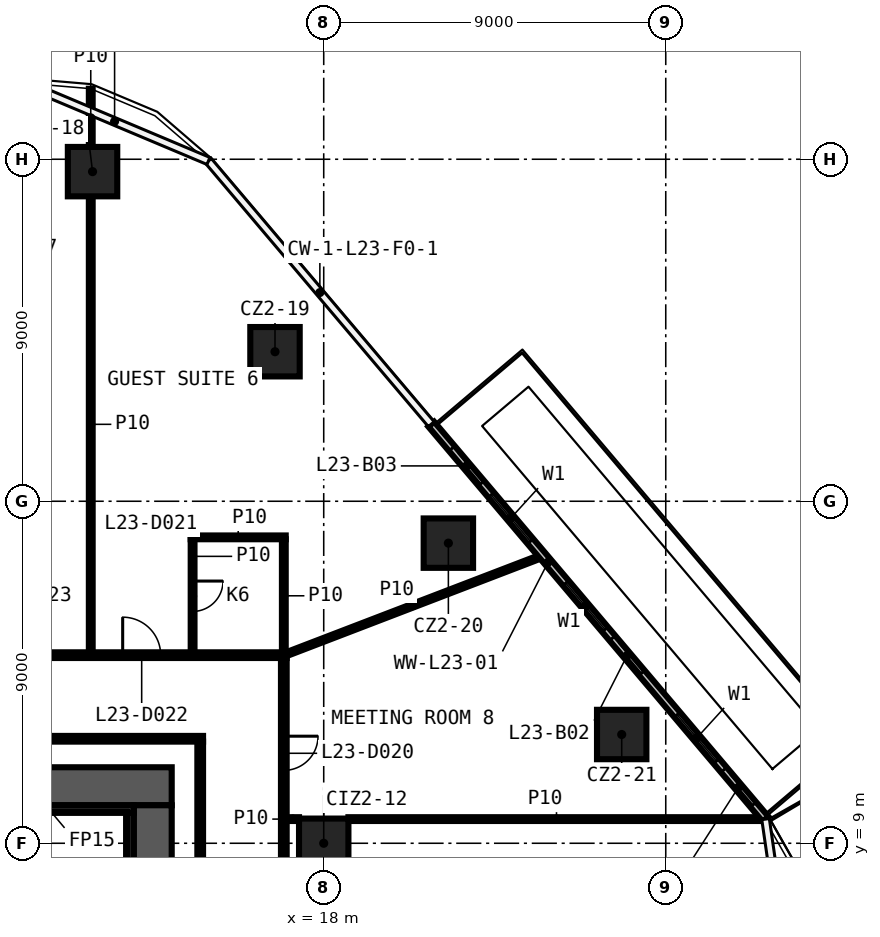
"""IFC4 building model, lengths in metres.
Left out: names, types, materials, properties, quantities, classifications, styles, units other than length and angle.
Written with IfcOpenShell. Run it as: python <this file> out.ifc"""

import sys

from ifc_helpers import new_model, si_unit, direction, frame, frame_2d, origin, origin_2d, place, context, subcontext, project, spatial, rectangle, extrude, element, fill, save


model = new_model("IFC4")
c1 = context("Model", 3, precision=1e-05, world=origin(), true_north=direction((0.0, 1.0)))
c2 = subcontext(c1, "Body", "Model", "MODEL_VIEW")
j1 = project(units=[si_unit("LENGTHUNIT", "METRE"), si_unit("PLANEANGLEUNIT", "RADIAN")], contexts=[c1])
p1 = place(None, origin())
s1 = spatial("IfcSite", under=j1, at=p1, CompositionType="ELEMENT")
p2 = place(p1, origin())
s2 = spatial("IfcBuilding", under=s1, at=p2, CompositionType="ELEMENT")
p3 = place(p2, frame((0.0, 0.0, 110.0)))
s3 = spatial("IfcBuildingStorey", under=s2, at=p3, CompositionType="ELEMENT", Elevation=110.0)
for number, where, z_axis, x_axis in (
    (1, (11.917, 26.674, 0.0), (0.0, 0.0, 1.0), (1.0, 0.0, 0.0)),
    (2, (16.718, 21.935, 0.0), (0.0, 0.0, 1.0), (1.0, 0.0, 0.0)),
    (3, (21.28, 16.898, 0.0), (0.0, 0.0, 1.0), (1.0, 0.0, 0.0)),
    (4, (25.841, 11.862, 0.0), (0.0, 0.0, 1.0), (1.0, 0.0, 0.0)),
    (5, (18.0, 9.0, 0.0), (0.0, 0.0, 1.0), (1.0, 0.0, 0.0)),
):
    element("IfcColumn", number, at=place(p3, frame(where, z_axis=z_axis, x_axis=x_axis)), inside=s3, PredefinedType="COLUMN", context=c2, shape_type="SweptSolid", body=[
        extrude(rectangle(XDim=1.3, YDim=1.3, at=origin_2d()), origin(), (0.0, 0.0, 1.0), 3.3),
    ])
p4 = place(p3, frame((17.025, 9.636, 0.0), z_axis=(0.0, 0.0, 1.0), x_axis=(1.0, 0.0, 0.0)))
e6 = element("IfcWall", 6, at=p4, inside=s3, PredefinedType="PARTITIONING", context=c2, shape_type="SweptSolid", body=[
    extrude(rectangle(XDim=0.325, YDim=0.1, at=frame_2d((0.163, 0.0))), origin(), (0.0, 0.0, 1.0), 3.3),
])
p5 = place(p3, frame((18.65, 9.636, 0.0), z_axis=(0.0, 0.0, 1.0), x_axis=(1.0, 0.0, 0.0)))
e7 = element("IfcWall", 7, at=p5, inside=s3, PredefinedType="PARTITIONING", context=c2, shape_type="SweptSolid", body=[
    extrude(rectangle(XDim=10.95, YDim=0.1, at=frame_2d((5.475, 0.0))), origin(), (0.0, 0.0, 1.0), 3.3),
])
p6 = place(p3, frame((3.6, 11.75, 0.0), z_axis=(0.0, 0.0, 1.0), x_axis=(1.0, 0.0, 0.0)))
e8 = element("IfcWall", 8, at=p6, inside=s3, PredefinedType="PARTITIONING", context=c2, shape_type="SweptSolid", body=[
    extrude(rectangle(XDim=11.225, YDim=0.15, at=frame_2d((5.612, 0.0))), origin(), (0.0, 0.0, 1.0), 3.3),
])
p7 = place(p3, frame((-17.025, 13.95, 0.0), z_axis=(0.0, 0.0, 1.0), x_axis=(1.0, 0.0, 0.0)))
e9 = element("IfcWall", 9, at=p7, inside=s3, PredefinedType="PARTITIONING", context=c2, shape_type="SweptSolid", body=[
    extrude(rectangle(XDim=34.05, YDim=0.15, at=frame_2d((17.025, 0.0))), origin(), (0.0, 0.0, 1.0), 3.3),
])
p8 = place(p7, frame((29.735, 0.0, 0.0)))
e10 = element("IfcOpeningElement", 10, at=p8, cuts=e9, PredefinedType="OPENING", context=c2, shape_type="SweptSolid", body=[
    extrude(rectangle(XDim=1.0, YDim=2.1, at=frame_2d((0.5, 1.05))), frame((0.0, 0.085, 0.0), z_axis=(0.0, -1.0, 0.0), x_axis=(1.0, 0.0, 0.0)), (0.0, 0.0, 1.0), 0.17),
])
p9 = place(p7, frame((25.513, 0.0, 0.0)))
e11 = element("IfcOpeningElement", 11, at=p9, cuts=e9, PredefinedType="OPENING", context=c2, shape_type="SweptSolid", body=[
    extrude(rectangle(XDim=1.0, YDim=2.1, at=frame_2d((0.5, 1.05))), frame((0.0, 0.085, 0.0), z_axis=(0.0, -1.0, 0.0), x_axis=(1.0, 0.0, 0.0)), (0.0, 0.0, 1.0), 0.17),
])
p10 = place(p7, frame((18.631, 0.0, 0.0)))
e12 = element("IfcOpeningElement", 12, at=p10, cuts=e9, PredefinedType="OPENING", context=c2, shape_type="SweptSolid", body=[
    extrude(rectangle(XDim=1.0, YDim=2.1, at=frame_2d((0.5, 1.05))), frame((0.0, 0.085, 0.0), z_axis=(0.0, -1.0, 0.0), x_axis=(1.0, 0.0, 0.0)), (0.0, 0.0, 1.0), 0.17),
])
p11 = place(p7, frame((16.545, 0.0, 0.0)))
e13 = element("IfcOpeningElement", 13, at=p11, cuts=e9, PredefinedType="OPENING", context=c2, shape_type="SweptSolid", body=[
    extrude(rectangle(XDim=1.0, YDim=2.1, at=frame_2d((0.5, 1.05))), frame((0.0, 0.085, 0.0), z_axis=(0.0, -1.0, 0.0), x_axis=(1.0, 0.0, 0.0)), (0.0, 0.0, 1.0), 0.17),
])
p12 = place(p7, frame((9.659, 0.0, 0.0)))
e14 = element("IfcOpeningElement", 14, at=p12, cuts=e9, PredefinedType="OPENING", context=c2, shape_type="SweptSolid", body=[
    extrude(rectangle(XDim=1.0, YDim=2.1, at=frame_2d((0.5, 1.05))), frame((0.0, 0.085, 0.0), z_axis=(0.0, -1.0, 0.0), x_axis=(1.0, 0.0, 0.0)), (0.0, 0.0, 1.0), 0.17),
])
p13 = place(p7, frame((7.577, 0.0, 0.0)))
e15 = element("IfcOpeningElement", 15, at=p13, cuts=e9, PredefinedType="OPENING", context=c2, shape_type="SweptSolid", body=[
    extrude(rectangle(XDim=1.0, YDim=2.1, at=frame_2d((0.5, 1.05))), frame((0.0, 0.085, 0.0), z_axis=(0.0, -1.0, 0.0), x_axis=(1.0, 0.0, 0.0)), (0.0, 0.0, 1.0), 0.17),
])
p14 = place(p7, frame((2.381, 0.0, 0.0)))
e16 = element("IfcOpeningElement", 16, at=p14, cuts=e9, PredefinedType="OPENING", context=c2, shape_type="SweptSolid", body=[
    extrude(rectangle(XDim=0.9, YDim=2.1, at=frame_2d((0.45, 1.05))), frame((0.0, 0.085, 0.0), z_axis=(0.0, -1.0, 0.0), x_axis=(1.0, 0.0, 0.0)), (0.0, 0.0, 1.0), 0.17),
])
p15 = place(p3, frame((14.5, 17.05, 0.0), z_axis=(0.0, 0.0, 1.0), x_axis=(1.0, 0.0, 0.0)))
e17 = element("IfcWall", 17, at=p15, inside=s3, PredefinedType="PARTITIONING", context=c2, shape_type="SweptSolid", body=[
    extrude(rectangle(XDim=2.5, YDim=0.1, at=frame_2d((1.25, 0.0))), origin(), (0.0, 0.0, 1.0), 3.3),
])
p16 = place(p3, frame((16.95, 13.95, 0.0), z_axis=(0.0, 0.0, 1.0), x_axis=(0.933635037811, 0.358225649796, 0.0)))
e18 = element("IfcWall", 18, at=p16, inside=s3, PredefinedType="PARTITIONING", context=c2, shape_type="SweptSolid", body=[
    extrude(rectangle(XDim=7.275, YDim=0.1, at=frame_2d((3.638, 0.0))), origin(), (0.0, 0.0, 1.0), 3.3),
])
p17 = place(p3, frame((16.95, 13.875, 0.0), z_axis=(0.0, 0.0, 1.0), x_axis=(0.0, -1.0, 0.0)))
e19 = element("IfcWall", 19, at=p17, inside=s3, PredefinedType="PARTITIONING", context=c2, shape_type="SweptSolid", body=[
    extrude(rectangle(XDim=27.75, YDim=0.15, at=frame_2d((13.875, 0.0))), origin(), (0.0, 0.0, 1.0), 3.3),
])
p18 = place(p17, frame((24.917, 0.0, 0.0)))
e20 = element("IfcOpeningElement", 20, at=p18, cuts=e19, PredefinedType="OPENING", context=c2, shape_type="SweptSolid", body=[
    extrude(rectangle(XDim=0.9, YDim=2.1, at=frame_2d((0.45, 1.05))), frame((0.0, 0.085, 0.0), z_axis=(0.0, -1.0, 0.0), x_axis=(1.0, 0.0, 0.0)), (0.0, 0.0, 1.0), 0.17),
])
p19 = place(p17, frame((20.086, 0.0, 0.0)))
e21 = element("IfcOpeningElement", 21, at=p19, cuts=e19, PredefinedType="OPENING", context=c2, shape_type="SweptSolid", body=[
    extrude(rectangle(XDim=0.9, YDim=2.1, at=frame_2d((0.45, 1.05))), frame((0.0, 0.085, 0.0), z_axis=(0.0, -1.0, 0.0), x_axis=(1.0, 0.0, 0.0)), (0.0, 0.0, 1.0), 0.17),
])
p20 = place(p17, frame((16.047, 0.0, 0.0)))
e22 = element("IfcOpeningElement", 22, at=p20, cuts=e19, PredefinedType="OPENING", context=c2, shape_type="SweptSolid", body=[
    extrude(rectangle(XDim=0.9, YDim=2.1, at=frame_2d((0.45, 1.05))), frame((0.0, 0.085, 0.0), z_axis=(0.0, -1.0, 0.0), x_axis=(1.0, 0.0, 0.0)), (0.0, 0.0, 1.0), 0.17),
])
p21 = place(p17, frame((11.091, 0.0, 0.0)))
e23 = element("IfcOpeningElement", 23, at=p21, cuts=e19, PredefinedType="OPENING", context=c2, shape_type="SweptSolid", body=[
    extrude(rectangle(XDim=0.9, YDim=2.1, at=frame_2d((0.45, 1.05))), frame((0.0, 0.085, 0.0), z_axis=(0.0, -1.0, 0.0), x_axis=(1.0, 0.0, 0.0)), (0.0, 0.0, 1.0), 0.17),
])
p22 = place(p17, frame((7.093, 0.0, 0.0)))
e24 = element("IfcOpeningElement", 24, at=p22, cuts=e19, PredefinedType="OPENING", context=c2, shape_type="SweptSolid", body=[
    extrude(rectangle(XDim=0.9, YDim=2.1, at=frame_2d((0.45, 1.05))), frame((0.0, 0.085, 0.0), z_axis=(0.0, -1.0, 0.0), x_axis=(1.0, 0.0, 0.0)), (0.0, 0.0, 1.0), 0.17),
])
p23 = place(p17, frame((2.057, 0.0, 0.0)))
e25 = element("IfcOpeningElement", 25, at=p23, cuts=e19, PredefinedType="OPENING", context=c2, shape_type="SweptSolid", body=[
    extrude(rectangle(XDim=0.9, YDim=2.1, at=frame_2d((0.45, 1.05))), frame((0.0, 0.085, 0.0), z_axis=(0.0, -1.0, 0.0), x_axis=(1.0, 0.0, 0.0)), (0.0, 0.0, 1.0), 0.17),
])
p24 = place(p3, frame((16.95, 14.025, 0.0), z_axis=(0.0, 0.0, 1.0), x_axis=(0.0, 1.0, 0.0)))
e26 = element("IfcWall", 26, at=p24, inside=s3, PredefinedType="PARTITIONING", context=c2, shape_type="SweptSolid", body=[
    extrude(rectangle(XDim=2.975, YDim=0.1, at=frame_2d((1.488, 0.0))), origin(), (0.0, 0.0, 1.0), 3.3),
])
p25 = place(p3, frame((14.75, -11.675, 0.0), z_axis=(0.0, 0.0, 1.0), x_axis=(0.0, 1.0, 0.0)))
e27 = element("IfcWall", 27, at=p25, inside=s3, PredefinedType="PARTITIONING", context=c2, shape_type="SweptSolid", body=[
    extrude(rectangle(XDim=23.35, YDim=0.15, at=frame_2d((11.675, 0.0))), origin(), (0.0, 0.0, 1.0), 3.3),
])
p26 = place(p25, frame((11.225, 0.0, 0.0)))
e28 = element("IfcOpeningElement", 28, at=p26, cuts=e27, PredefinedType="OPENING", context=c2, shape_type="SweptSolid", body=[
    extrude(rectangle(XDim=0.9, YDim=2.1, at=frame_2d((0.45, 1.05))), frame((0.0, 0.085, 0.0), z_axis=(0.0, -1.0, 0.0), x_axis=(1.0, 0.0, 0.0)), (0.0, 0.0, 1.0), 0.17),
])
p27 = place(p3, frame((14.55, 17.0, 0.0), z_axis=(0.0, 0.0, 1.0), x_axis=(0.0, -1.0, 0.0)))
e29 = element("IfcWall", 29, at=p27, inside=s3, PredefinedType="PARTITIONING", context=c2, shape_type="SweptSolid", body=[
    extrude(rectangle(XDim=2.975, YDim=0.1, at=frame_2d((1.488, 0.0))), origin(), (0.0, 0.0, 1.0), 3.3),
])
p28 = place(p27, frame((1.1, 0.0, 0.0)))
e30 = element("IfcOpeningElement", 30, at=p28, cuts=e29, PredefinedType="OPENING", context=c2, shape_type="SweptSolid", body=[
    extrude(rectangle(XDim=0.8, YDim=2.1, at=frame_2d((0.4, 1.05))), frame((0.0, 0.06, 0.0), z_axis=(0.0, -1.0, 0.0), x_axis=(1.0, 0.0, 0.0)), (0.0, 0.0, 1.0), 0.12),
])
p29 = place(p3, frame((11.87, 14.025, 0.0), z_axis=(0.0, 0.0, 1.0), x_axis=(0.0, 1.0, 0.0)))
e31 = element("IfcWall", 31, at=p29, inside=s3, PredefinedType="PARTITIONING", context=c2, shape_type="SweptSolid", body=[
    extrude(rectangle(XDim=11.999, YDim=0.1, at=frame_2d((6.0, 0.0))), origin(), (0.0, 0.0, 1.0), 3.3),
])
p30 = place(p3, frame((11.87, 27.324, 0.0), z_axis=(0.0, 0.0, 1.0), x_axis=(0.0, 1.0, 0.0)))
e32 = element("IfcWall", 32, at=p30, inside=s3, PredefinedType="PARTITIONING", context=c2, shape_type="SweptSolid", body=[
    extrude(rectangle(XDim=1.531, YDim=0.1, at=frame_2d((0.766, 0.0))), origin(), (0.0, 0.0, 1.0), 3.3),
])
p31 = place(p3, frame((29.626, 9.636, 0.0), z_axis=(0.0, 0.0, 1.0), x_axis=(-0.6460547702, 0.763291054514, 0.0)))
e33 = element("IfcWall", 33, at=p31, inside=s3, PredefinedType="SOLIDWALL", context=c2, shape_type="SweptSolid", body=[
    extrude(rectangle(XDim=13.615, YDim=0.2, at=frame_2d((6.808, 0.0))), origin(), (0.0, 0.0, 1.0), 3.3),
])
p32 = place(p31, frame((2.0, 0.0, 0.6)))
e34 = element("IfcOpeningElement", 34, at=p32, cuts=e33, PredefinedType="OPENING", context=c2, shape_type="SweptSolid", body=[
    extrude(rectangle(XDim=1.6, YDim=2.4, at=frame_2d((0.8, 1.2))), frame((0.0, 0.11, 0.0), z_axis=(0.0, -1.0, 0.0), x_axis=(1.0, 0.0, 0.0)), (0.0, 0.0, 1.0), 0.22),
])
p33 = place(p31, frame((0.5, 0.0, 0.0)))
e35 = element("IfcOpeningElement", 35, at=p33, cuts=e33, PredefinedType="OPENING", context=c2, shape_type="SweptSolid", body=[
    extrude(rectangle(XDim=1.2, YDim=2.4, at=frame_2d((0.6, 1.2))), frame((0.0, 0.11, 0.0), z_axis=(0.0, -1.0, 0.0), x_axis=(1.0, 0.0, 0.0)), (0.0, 0.0, 1.0), 0.22),
])
p34 = place(p31, frame((6.538, 0.0, 0.6)))
e36 = element("IfcOpeningElement", 36, at=p34, cuts=e33, PredefinedType="OPENING", context=c2, shape_type="SweptSolid", body=[
    extrude(rectangle(XDim=1.6, YDim=2.4, at=frame_2d((0.8, 1.2))), frame((0.0, 0.11, 0.0), z_axis=(0.0, -1.0, 0.0), x_axis=(1.0, 0.0, 0.0)), (0.0, 0.0, 1.0), 0.22),
])
p35 = place(p31, frame((5.038, 0.0, 0.0)))
e37 = element("IfcOpeningElement", 37, at=p35, cuts=e33, PredefinedType="OPENING", context=c2, shape_type="SweptSolid", body=[
    extrude(rectangle(XDim=1.2, YDim=2.4, at=frame_2d((0.6, 1.2))), frame((0.0, 0.11, 0.0), z_axis=(0.0, -1.0, 0.0), x_axis=(1.0, 0.0, 0.0)), (0.0, 0.0, 1.0), 0.22),
])
p36 = place(p31, frame((9.577, 0.0, 0.6)))
e38 = element("IfcOpeningElement", 38, at=p36, cuts=e33, PredefinedType="OPENING", context=c2, shape_type="SweptSolid", body=[
    extrude(rectangle(XDim=1.6, YDim=2.4, at=frame_2d((0.8, 1.2))), frame((0.0, 0.11, 0.0), z_axis=(0.0, -1.0, 0.0), x_axis=(1.0, 0.0, 0.0)), (0.0, 0.0, 1.0), 0.22),
])
p37 = place(p31, frame((11.577, 0.0, 0.0)))
e39 = element("IfcOpeningElement", 39, at=p37, cuts=e33, PredefinedType="OPENING", context=c2, shape_type="SweptSolid", body=[
    extrude(rectangle(XDim=1.2, YDim=2.4, at=frame_2d((0.6, 1.2))), frame((0.0, 0.11, 0.0), z_axis=(0.0, -1.0, 0.0), x_axis=(1.0, 0.0, 0.0)), (0.0, 0.0, 1.0), 0.22),
])
p38 = place(p3, frame((-14.0, 10.5, 0.0), z_axis=(0.0, 0.0, 1.0), x_axis=(1.0, 0.0, 0.0)))
e40 = element("IfcWall", 40, at=p38, inside=s3, PredefinedType="SHEAR", context=c2, shape_type="SweptSolid", body=[
    extrude(rectangle(XDim=28.0, YDim=1.0, at=frame_2d((14.0, 0.0))), origin(), (0.0, 0.0, 1.0), 3.3),
])
p39 = place(p38, frame((15.9, 0.0, 0.0)))
e41 = element("IfcOpeningElement", 41, at=p39, cuts=e40, PredefinedType="OPENING", context=c2, shape_type="SweptSolid", body=[
    extrude(rectangle(XDim=1.6, YDim=2.1, at=frame_2d((0.8, 1.05))), frame((0.0, 0.51, 0.0), z_axis=(0.0, -1.0, 0.0), x_axis=(1.0, 0.0, 0.0)), (0.0, 0.0, 1.0), 1.02),
])
p40 = place(p3, frame((13.5, 10.0, 0.0), z_axis=(0.0, 0.0, 1.0), x_axis=(0.0, -1.0, 0.0)))
e42 = element("IfcWall", 42, at=p40, inside=s3, PredefinedType="SHEAR", context=c2, shape_type="SweptSolid", body=[
    extrude(rectangle(XDim=20.0, YDim=1.0, at=frame_2d((10.0, 0.0))), origin(), (0.0, 0.0, 1.0), 3.3),
])
p41 = place(p3, frame((3.9, 9.9, 0.0), z_axis=(0.0, 0.0, 1.0), x_axis=(1.0, 0.0, 0.0)))
e43 = element("IfcWall", 43, at=p41, inside=s3, PredefinedType="SHEAR", context=c2, shape_type="SweptSolid", body=[
    extrude(rectangle(XDim=9.1, YDim=0.2, at=frame_2d((4.55, 0.0))), origin(), (0.0, 0.0, 1.0), 3.3),
])
p42 = place(p3, frame((12.9, 9.8, 0.0), z_axis=(0.0, 0.0, 1.0), x_axis=(0.0, -1.0, 0.0)))
e44 = element("IfcWall", 44, at=p42, inside=s3, PredefinedType="SHEAR", context=c2, shape_type="SweptSolid", body=[
    extrude(rectangle(XDim=19.6, YDim=0.2, at=frame_2d((9.8, 0.0))), origin(), (0.0, 0.0, 1.0), 3.3),
])
p43 = place(p23, origin())
e45 = element("IfcDoor", 45, at=p43, inside=s3, OperationType="SINGLE_SWING_LEFT", PredefinedType="DOOR", context=c2, shape_type="SweptSolid", body=[
    extrude(rectangle(XDim=0.9, YDim=2.1, at=frame_2d((0.45, 1.05))), frame((0.0, 0.025, 0.0), z_axis=(0.0, -1.0, 0.0), x_axis=(1.0, 0.0, 0.0)), (0.0, 0.0, 1.0), 0.05),
])
fill(e25, e45)
p44 = place(p28, origin())
e46 = element("IfcDoor", 46, at=p44, inside=s3, OperationType="SINGLE_SWING_LEFT", PredefinedType="DOOR", context=c2, shape_type="SweptSolid", body=[
    extrude(rectangle(XDim=0.8, YDim=2.1, at=frame_2d((0.4, 1.05))), frame((0.0, 0.025, 0.0), z_axis=(0.0, -1.0, 0.0), x_axis=(1.0, 0.0, 0.0)), (0.0, 0.0, 1.0), 0.05),
])
fill(e30, e46)
p45 = place(p8, origin())
e47 = element("IfcDoor", 47, at=p45, inside=s3, OperationType="SINGLE_SWING_RIGHT", PredefinedType="DOOR", context=c2, shape_type="SweptSolid", body=[
    extrude(rectangle(XDim=1.0, YDim=2.1, at=frame_2d((0.5, 1.05))), frame((0.0, 0.025, 0.0), z_axis=(0.0, -1.0, 0.0), x_axis=(1.0, 0.0, 0.0)), (0.0, 0.0, 1.0), 0.05),
])
fill(e10, e47)
p46 = place(p32, origin())
e48 = element("IfcWindow", 48, at=p46, inside=s3, PartitioningType="SINGLE_PANEL", PredefinedType="WINDOW", context=c2, shape_type="SweptSolid", body=[
    extrude(rectangle(XDim=1.6, YDim=2.4, at=frame_2d((0.8, 1.2))), frame((0.0, 0.03, 0.0), z_axis=(0.0, -1.0, 0.0), x_axis=(1.0, 0.0, 0.0)), (0.0, 0.0, 1.0), 0.06),
])
fill(e34, e48)
p47 = place(p33, origin())
e49 = element("IfcDoor", 49, at=p47, inside=s3, OperationType="SLIDING_TO_LEFT", PredefinedType="DOOR", context=c2, shape_type="SweptSolid", body=[
    extrude(rectangle(XDim=1.2, YDim=2.4, at=frame_2d((0.6, 1.2))), frame((0.0, 0.025, 0.0), z_axis=(0.0, -1.0, 0.0), x_axis=(1.0, 0.0, 0.0)), (0.0, 0.0, 1.0), 0.05),
])
fill(e35, e49)
p48 = place(p34, origin())
e50 = element("IfcWindow", 50, at=p48, inside=s3, PartitioningType="SINGLE_PANEL", PredefinedType="WINDOW", context=c2, shape_type="SweptSolid", body=[
    extrude(rectangle(XDim=1.6, YDim=2.4, at=frame_2d((0.8, 1.2))), frame((0.0, 0.03, 0.0), z_axis=(0.0, -1.0, 0.0), x_axis=(1.0, 0.0, 0.0)), (0.0, 0.0, 1.0), 0.06),
])
fill(e36, e50)
p49 = place(p35, origin())
e51 = element("IfcDoor", 51, at=p49, inside=s3, OperationType="SLIDING_TO_LEFT", PredefinedType="DOOR", context=c2, shape_type="SweptSolid", body=[
    extrude(rectangle(XDim=1.2, YDim=2.4, at=frame_2d((0.6, 1.2))), frame((0.0, 0.025, 0.0), z_axis=(0.0, -1.0, 0.0), x_axis=(1.0, 0.0, 0.0)), (0.0, 0.0, 1.0), 0.05),
])
fill(e37, e51)
p50 = place(p36, origin())
e52 = element("IfcWindow", 52, at=p50, inside=s3, PartitioningType="SINGLE_PANEL", PredefinedType="WINDOW", context=c2, shape_type="SweptSolid", body=[
    extrude(rectangle(XDim=1.6, YDim=2.4, at=frame_2d((0.8, 1.2))), frame((0.0, 0.03, 0.0), z_axis=(0.0, -1.0, 0.0), x_axis=(1.0, 0.0, 0.0)), (0.0, 0.0, 1.0), 0.06),
])
fill(e38, e52)
p51 = place(p37, origin())
e53 = element("IfcDoor", 53, at=p51, inside=s3, OperationType="SLIDING_TO_LEFT", PredefinedType="DOOR", context=c2, shape_type="SweptSolid", body=[
    extrude(rectangle(XDim=1.2, YDim=2.4, at=frame_2d((0.6, 1.2))), frame((0.0, 0.025, 0.0), z_axis=(0.0, -1.0, 0.0), x_axis=(1.0, 0.0, 0.0)), (0.0, 0.0, 1.0), 0.05),
])
fill(e39, e53)
save(model, sys.argv[1])
